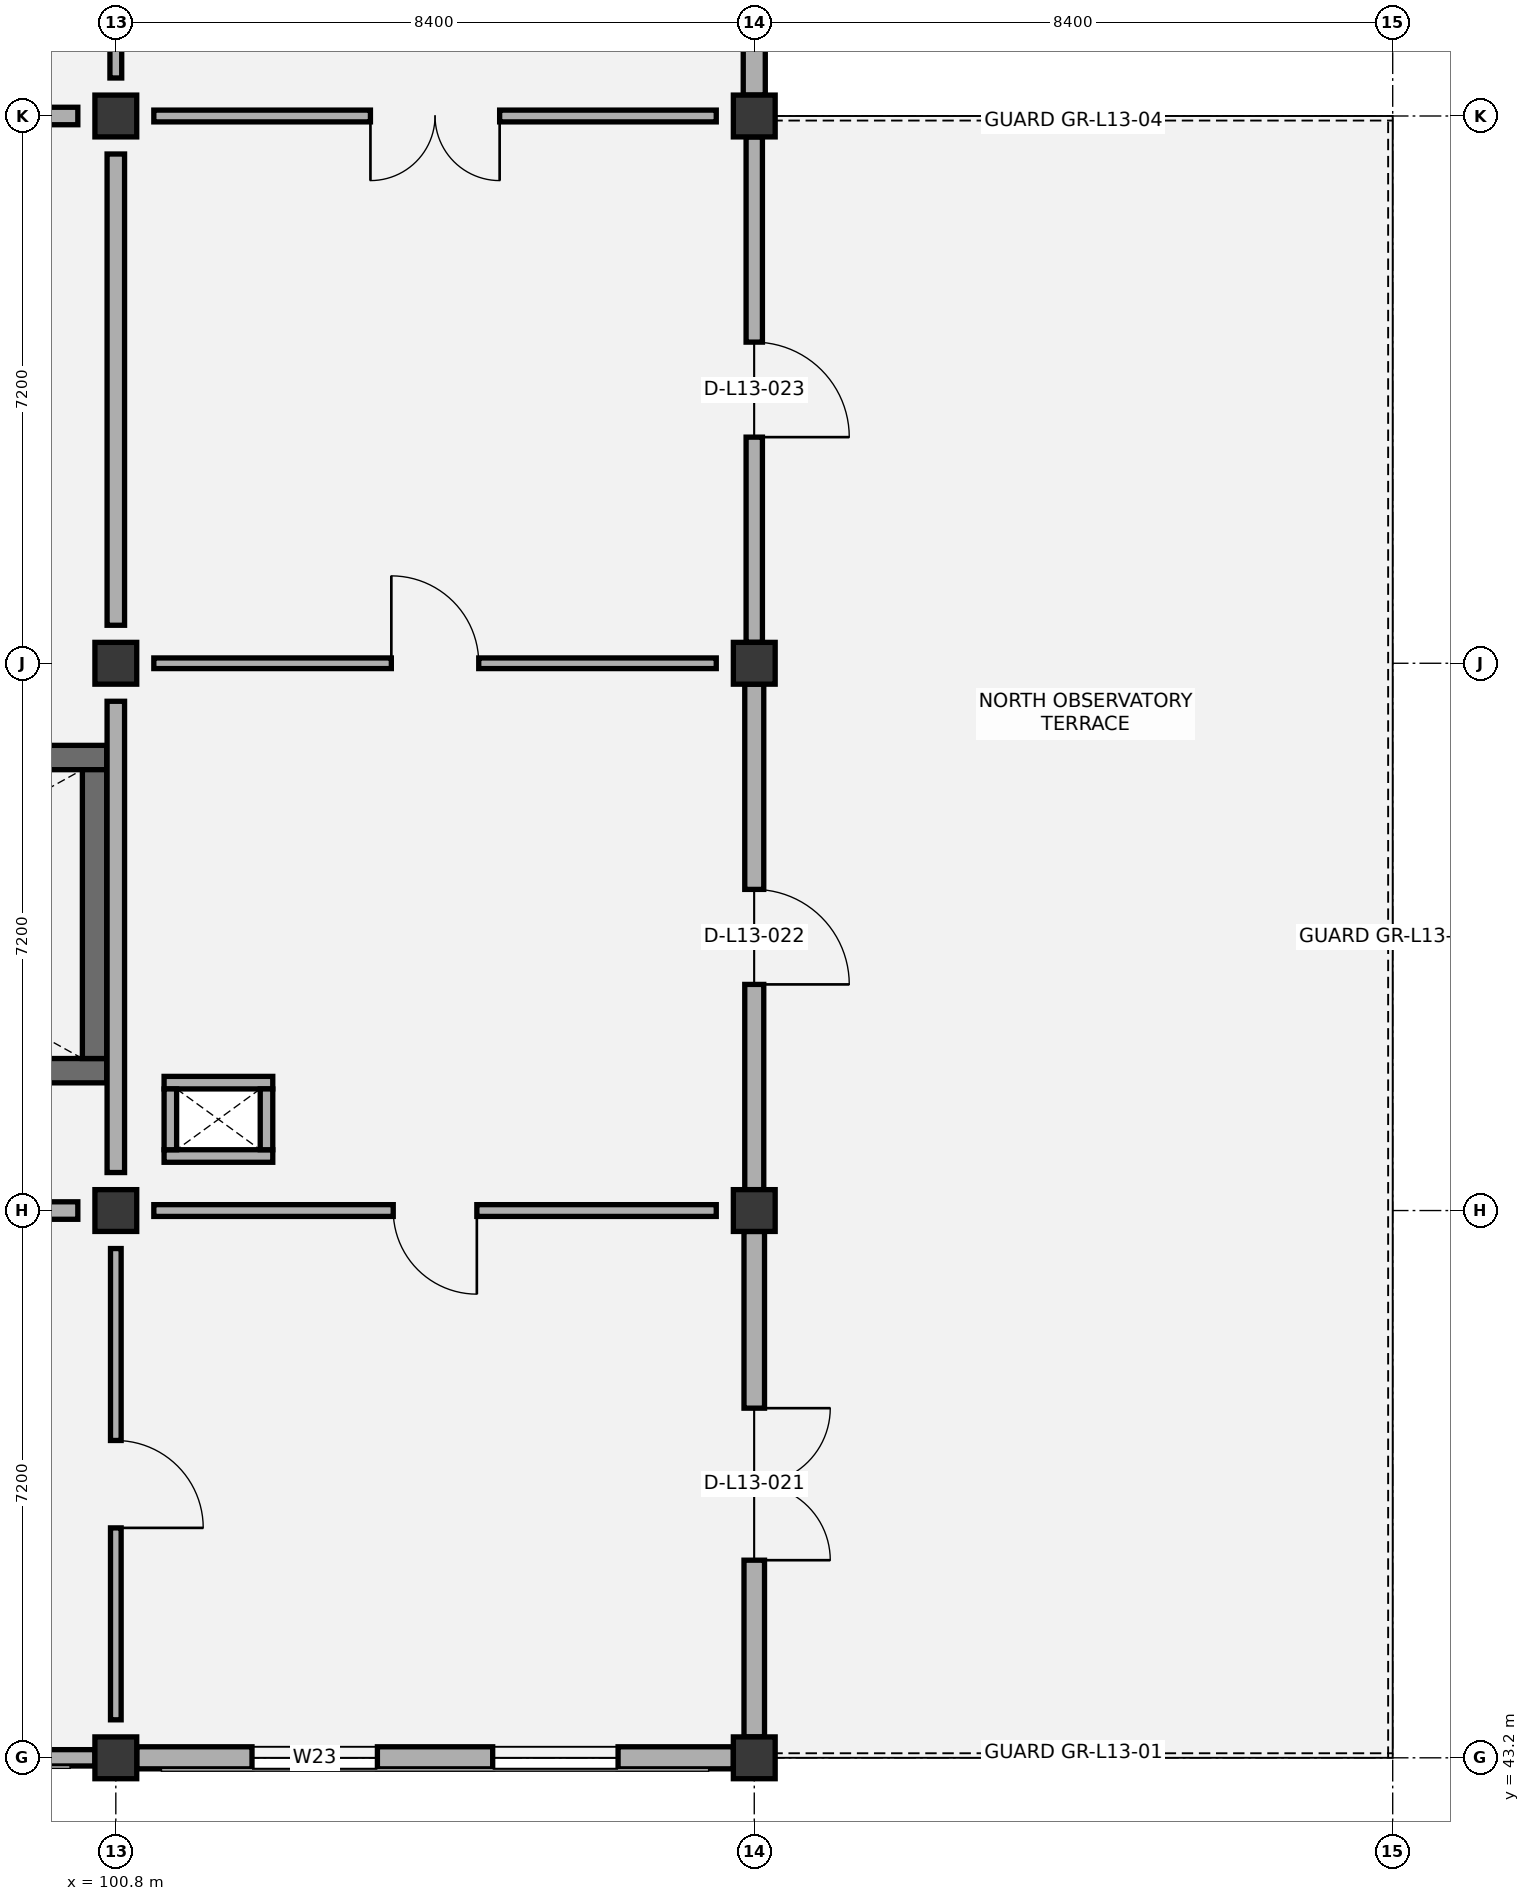
"""IFC4 building model, lengths in metres.
Left out: names, types, materials, properties, quantities, classifications, styles, units other than length and angle.
Written with IfcOpenShell. Run it as: python <this file> out.ifc"""

import sys

from ifc_helpers import new_model, si_unit, direction, frame, frame_2d, origin, origin_2d, place, context, subcontext, project, spatial, rectangle, extrude, element, fill, save


model = new_model("IFC4")
c1 = context("Model", 3, precision=1e-05, world=origin(), true_north=direction((0.0, 1.0)))
c2 = subcontext(c1, "Body", "Model", "MODEL_VIEW")
j1 = project(units=[si_unit("LENGTHUNIT", "METRE"), si_unit("PLANEANGLEUNIT", "RADIAN")], contexts=[c1])
p1 = place(None, origin())
s1 = spatial("IfcSite", under=j1, at=p1, CompositionType="ELEMENT")
p2 = place(p1, origin())
s2 = spatial("IfcBuilding", under=s1, at=p2, CompositionType="ELEMENT")
p3 = place(p2, frame((0.0, 0.0, 60.6)))
s3 = spatial("IfcBuildingStorey", under=s2, at=p3, CompositionType="ELEMENT", Elevation=60.6)
for number, where, z_axis, x_axis in (
    (1, (100.8, 43.2, 0.0), (0.0, 0.0, 1.0), (1.0, 0.0, 0.0)),
    (2, (100.8, 50.4, 0.0), (0.0, 0.0, 1.0), (1.0, 0.0, 0.0)),
    (3, (100.8, 57.6, 0.0), (0.0, 0.0, 1.0), (1.0, 0.0, 0.0)),
    (4, (100.8, 64.8, 0.0), (0.0, 0.0, 1.0), (1.0, 0.0, 0.0)),
    (5, (109.2, 43.2, 0.0), (0.0, 0.0, 1.0), (1.0, 0.0, 0.0)),
    (6, (109.2, 50.4, 0.0), (0.0, 0.0, 1.0), (1.0, 0.0, 0.0)),
    (7, (109.2, 57.6, 0.0), (0.0, 0.0, 1.0), (1.0, 0.0, 0.0)),
    (8, (109.2, 64.8, 0.0), (0.0, 0.0, 1.0), (1.0, 0.0, 0.0)),
):
    element("IfcColumn", number, at=place(p3, frame(where, z_axis=z_axis, x_axis=x_axis)), inside=s3, PredefinedType="COLUMN", context=c2, shape_type="SweptSolid", body=[
        extrude(rectangle(XDim=0.55, YDim=0.55, at=origin_2d()), origin(), (0.0, 0.0, 1.0), 4.2),
    ])
p4 = place(p3, frame((93.2, 52.24, 0.0), z_axis=(0.0, 0.0, 1.0), x_axis=(1.0, 0.0, 0.0)))
e9 = element("IfcWall", 9, at=p4, inside=s3, PredefinedType="SHEAR", context=c2, shape_type="SweptSolid", body=[
    extrude(rectangle(XDim=7.48, YDim=0.32, at=frame_2d((3.74, 0.0))), origin(), (0.0, 0.0, 1.0), 3.95),
])
p5 = place(p4, frame((0.45, 0.0, 0.0)))
e10 = element("IfcOpeningElement", 10, at=p5, cuts=e9, PredefinedType="OPENING", context=c2, shape_type="SweptSolid", body=[
    extrude(rectangle(XDim=1.05, YDim=2.15, at=frame_2d((0.525, 1.075))), frame((0.0, 0.17, 0.0), z_axis=(0.0, -1.0, 0.0), x_axis=(1.0, 0.0, 0.0)), (0.0, 0.0, 1.0), 0.34),
])
p6 = place(p3, frame((93.2, 56.36, 0.0), z_axis=(0.0, 0.0, 1.0), x_axis=(1.0, 0.0, 0.0)))
e11 = element("IfcWall", 11, at=p6, inside=s3, PredefinedType="SHEAR", context=c2, shape_type="SweptSolid", body=[
    extrude(rectangle(XDim=7.48, YDim=0.32, at=frame_2d((3.74, 0.0))), origin(), (0.0, 0.0, 1.0), 3.95),
])
p7 = place(p3, frame((100.52, 52.4, 0.0), z_axis=(0.0, 0.0, 1.0), x_axis=(0.0, 1.0, 0.0)))
e12 = element("IfcWall", 12, at=p7, inside=s3, PredefinedType="SHEAR", context=c2, shape_type="SweptSolid", body=[
    extrude(rectangle(XDim=3.8, YDim=0.32, at=frame_2d((1.9, 0.0))), origin(), (0.0, 0.0, 1.0), 3.95),
])
p8 = place(p3, frame((92.675, 43.2, 0.0), z_axis=(0.0, 0.0, 1.0), x_axis=(1.0, 0.0, 0.0)))
e13 = element("IfcWall", 13, at=p8, inside=s3, PredefinedType="SOLIDWALL", context=c2, shape_type="SweptSolid", body=[
    extrude(rectangle(XDim=7.85, YDim=0.215, at=frame_2d((3.925, 0.0))), origin(), (0.0, 0.0, 1.0), 3.395),
])
p9 = place(p8, frame((1.417, 0.0, 0.95)))
e14 = element("IfcOpeningElement", 14, at=p9, cuts=e13, PredefinedType="OPENING", context=c2, shape_type="SweptSolid", body=[
    extrude(rectangle(XDim=1.8, YDim=1.5, at=frame_2d((0.9, 0.75))), frame((0.0, 0.117, 0.0), z_axis=(0.0, -1.0, 0.0), x_axis=(1.0, 0.0, 0.0)), (0.0, 0.0, 1.0), 0.235),
])
p10 = place(p8, frame((4.633, 0.0, 0.95)))
e15 = element("IfcOpeningElement", 15, at=p10, cuts=e13, PredefinedType="OPENING", context=c2, shape_type="SweptSolid", body=[
    extrude(rectangle(XDim=1.8, YDim=1.5, at=frame_2d((0.9, 0.75))), frame((0.0, 0.117, 0.0), z_axis=(0.0, -1.0, 0.0), x_axis=(1.0, 0.0, 0.0)), (0.0, 0.0, 1.0), 0.235),
])
p11 = place(p3, frame((101.075, 43.2, 0.0), z_axis=(0.0, 0.0, 1.0), x_axis=(1.0, 0.0, 0.0)))
e16 = element("IfcWall", 16, at=p11, inside=s3, PredefinedType="SOLIDWALL", context=c2, shape_type="SweptSolid", body=[
    extrude(rectangle(XDim=7.85, YDim=0.29, at=frame_2d((3.925, 0.0))), origin(), (0.0, 0.0, 1.0), 3.395),
])
p12 = place(p11, frame((1.517, 0.0, 0.95)))
e17 = element("IfcOpeningElement", 17, at=p12, cuts=e16, PredefinedType="OPENING", context=c2, shape_type="SweptSolid", body=[
    extrude(rectangle(XDim=1.65, YDim=1.65, at=frame_2d((0.825, 0.825))), frame((0.0, 0.155, 0.0), z_axis=(0.0, -1.0, 0.0), x_axis=(1.0, 0.0, 0.0)), (0.0, 0.0, 1.0), 0.31),
])
p13 = place(p11, frame((4.683, 0.0, 0.95)))
e18 = element("IfcOpeningElement", 18, at=p13, cuts=e16, PredefinedType="OPENING", context=c2, shape_type="SweptSolid", body=[
    extrude(rectangle(XDim=1.65, YDim=1.65, at=frame_2d((0.825, 0.825))), frame((0.0, 0.155, 0.0), z_axis=(0.0, -1.0, 0.0), x_axis=(1.0, 0.0, 0.0)), (0.0, 0.0, 1.0), 0.31),
])
p14 = place(p3, frame((109.2, 43.475, 0.0), z_axis=(0.0, 0.0, 1.0), x_axis=(0.0, 1.0, 0.0)))
e19 = element("IfcWall", 19, at=p14, inside=s3, PredefinedType="SOLIDWALL", context=c2, shape_type="SweptSolid", body=[
    extrude(rectangle(XDim=6.65, YDim=0.27, at=frame_2d((3.325, 0.0))), origin(), (0.0, 0.0, 1.0), 3.395),
])
p15 = place(p14, frame((2.325, 0.0, 0.0)))
e20 = element("IfcOpeningElement", 20, at=p15, cuts=e19, PredefinedType="OPENING", context=c2, shape_type="SweptSolid", body=[
    extrude(rectangle(XDim=2.0, YDim=2.4, at=frame_2d((1.0, 1.2))), frame((0.0, 0.145, 0.0), z_axis=(0.0, -1.0, 0.0), x_axis=(1.0, 0.0, 0.0)), (0.0, 0.0, 1.0), 0.29),
])
p16 = place(p3, frame((109.2, 50.675, 0.0), z_axis=(0.0, 0.0, 1.0), x_axis=(0.0, 1.0, 0.0)))
e21 = element("IfcWall", 21, at=p16, inside=s3, PredefinedType="SOLIDWALL", context=c2, shape_type="SweptSolid", body=[
    extrude(rectangle(XDim=6.65, YDim=0.25, at=frame_2d((3.325, 0.0))), origin(), (0.0, 0.0, 1.0), 3.395),
])
p17 = place(p16, frame((2.7, 0.0, 0.0)))
e22 = element("IfcOpeningElement", 22, at=p17, cuts=e21, PredefinedType="OPENING", context=c2, shape_type="SweptSolid", body=[
    extrude(rectangle(XDim=1.25, YDim=2.15, at=frame_2d((0.625, 1.075))), frame((0.0, 0.135, 0.0), z_axis=(0.0, -1.0, 0.0), x_axis=(1.0, 0.0, 0.0)), (0.0, 0.0, 1.0), 0.27),
])
p18 = place(p3, frame((109.2, 57.875, 0.0), z_axis=(0.0, 0.0, 1.0), x_axis=(0.0, 1.0, 0.0)))
e23 = element("IfcWall", 23, at=p18, inside=s3, PredefinedType="SOLIDWALL", context=c2, shape_type="SweptSolid", body=[
    extrude(rectangle(XDim=6.65, YDim=0.215, at=frame_2d((3.325, 0.0))), origin(), (0.0, 0.0, 1.0), 3.395),
])
p19 = place(p18, frame((2.7, 0.0, 0.0)))
e24 = element("IfcOpeningElement", 24, at=p19, cuts=e23, PredefinedType="OPENING", context=c2, shape_type="SweptSolid", body=[
    extrude(rectangle(XDim=1.25, YDim=2.15, at=frame_2d((0.625, 1.075))), frame((0.0, 0.117, 0.0), z_axis=(0.0, -1.0, 0.0), x_axis=(1.0, 0.0, 0.0)), (0.0, 0.0, 1.0), 0.235),
])
p20 = place(p3, frame((109.2, 65.075, 0.0), z_axis=(0.0, 0.0, 1.0), x_axis=(0.0, 1.0, 0.0)))
e25 = element("IfcWall", 25, at=p20, inside=s3, PredefinedType="SOLIDWALL", context=c2, shape_type="SweptSolid", body=[
    extrude(rectangle(XDim=6.65, YDim=0.29, at=frame_2d((3.325, 0.0))), origin(), (0.0, 0.0, 1.0), 3.445),
])
p21 = place(p20, frame((1.317, 0.0, 0.95)))
e26 = element("IfcOpeningElement", 26, at=p21, cuts=e25, PredefinedType="OPENING", context=c2, shape_type="SweptSolid", body=[
    extrude(rectangle(XDim=1.35, YDim=1.65, at=frame_2d((0.675, 0.825))), frame((0.0, 0.155, 0.0), z_axis=(0.0, -1.0, 0.0), x_axis=(1.0, 0.0, 0.0)), (0.0, 0.0, 1.0), 0.31),
])
p22 = place(p20, frame((3.983, 0.0, 0.95)))
e27 = element("IfcOpeningElement", 27, at=p22, cuts=e25, PredefinedType="OPENING", context=c2, shape_type="SweptSolid", body=[
    extrude(rectangle(XDim=1.35, YDim=1.65, at=frame_2d((0.675, 0.825))), frame((0.0, 0.155, 0.0), z_axis=(0.0, -1.0, 0.0), x_axis=(1.0, 0.0, 0.0)), (0.0, 0.0, 1.0), 0.31),
])
for number, where, z_axis, x_axis in (
    (28, (101.435, 51.117, 0.0), (0.0, 0.0, 1.0), (1.0, 0.0, 0.0)),
    (29, (101.435, 52.083, 0.0), (0.0, 0.0, 1.0), (1.0, 0.0, 0.0)),
):
    element("IfcWall", number, at=place(p3, frame(where, z_axis=z_axis, x_axis=x_axis)), inside=s3, PredefinedType="PARTITIONING", context=c2, shape_type="SweptSolid", body=[
        extrude(rectangle(XDim=1.43, YDim=0.165, at=frame_2d((0.715, 0.0))), origin(), (0.0, 0.0, 1.0), 3.95),
    ])
for number, where, z_axis, x_axis in (
    (30, (101.518, 51.2, 0.0), (0.0, 0.0, 1.0), (0.0, 1.0, 0.0)),
    (31, (102.782, 51.2, 0.0), (0.0, 0.0, 1.0), (0.0, 1.0, 0.0)),
):
    element("IfcWall", number, at=place(p3, frame(where, z_axis=z_axis, x_axis=x_axis)), inside=s3, PredefinedType="PARTITIONING", context=c2, shape_type="SweptSolid", body=[
        extrude(rectangle(XDim=0.8, YDim=0.165, at=frame_2d((0.4, 0.0))), origin(), (0.0, 0.0, 1.0), 3.95),
    ])
p23 = place(p3, frame((100.8, 43.7, 0.0), z_axis=(0.0, 0.0, 1.0), x_axis=(0.0, 1.0, 0.0)))
e32 = element("IfcWall", 32, at=p23, inside=s3, PredefinedType="PARTITIONING", context=c2, shape_type="SweptSolid", body=[
    extrude(rectangle(XDim=6.2, YDim=0.14, at=frame_2d((3.1, 0.0))), origin(), (0.0, 0.0, 1.0), 3.445),
])
p24 = place(p23, frame((2.525, 0.0, 0.0)))
e33 = element("IfcOpeningElement", 33, at=p24, cuts=e32, PredefinedType="OPENING", context=c2, shape_type="SweptSolid", body=[
    extrude(rectangle(XDim=1.15, YDim=2.1, at=frame_2d((0.575, 1.05))), frame((0.0, 0.08, 0.0), z_axis=(0.0, -1.0, 0.0), x_axis=(1.0, 0.0, 0.0)), (0.0, 0.0, 1.0), 0.16),
])
p25 = place(p3, frame((92.9, 50.4, 0.0), z_axis=(0.0, 0.0, 1.0), x_axis=(1.0, 0.0, 0.0)))
e34 = element("IfcWall", 34, at=p25, inside=s3, PredefinedType="PARTITIONING", context=c2, shape_type="SweptSolid", body=[
    extrude(rectangle(XDim=7.4, YDim=0.23, at=frame_2d((3.7, 0.0))), origin(), (0.0, 0.0, 1.0), 3.655),
])
p26 = place(p25, frame((2.95, 0.0, 0.0)))
e35 = element("IfcOpeningElement", 35, at=p26, cuts=e34, PredefinedType="OPENING", context=c2, shape_type="SweptSolid", body=[
    extrude(rectangle(XDim=1.5, YDim=2.15, at=frame_2d((0.75, 1.075))), frame((0.0, 0.125, 0.0), z_axis=(0.0, -1.0, 0.0), x_axis=(1.0, 0.0, 0.0)), (0.0, 0.0, 1.0), 0.25),
])
p27 = place(p3, frame((100.8, 50.9, 0.0), z_axis=(0.0, 0.0, 1.0), x_axis=(0.0, 1.0, 0.0)))
e36 = element("IfcWall", 36, at=p27, inside=s3, PredefinedType="PARTITIONING", context=c2, shape_type="SweptSolid", body=[
    extrude(rectangle(XDim=6.2, YDim=0.23, at=frame_2d((3.1, 0.0))), origin(), (0.0, 0.0, 1.0), 3.655),
])
p28 = place(p3, frame((100.8, 58.1, 0.0), z_axis=(0.0, 0.0, 1.0), x_axis=(0.0, 1.0, 0.0)))
e37 = element("IfcWall", 37, at=p28, inside=s3, PredefinedType="PARTITIONING", context=c2, shape_type="SweptSolid", body=[
    extrude(rectangle(XDim=6.2, YDim=0.23, at=frame_2d((3.1, 0.0))), origin(), (0.0, 0.0, 1.0), 3.445),
])
p29 = place(p3, frame((92.9, 64.8, 0.0), z_axis=(0.0, 0.0, 1.0), x_axis=(1.0, 0.0, 0.0)))
e38 = element("IfcWall", 38, at=p29, inside=s3, PredefinedType="PARTITIONING", context=c2, shape_type="SweptSolid", body=[
    extrude(rectangle(XDim=7.4, YDim=0.23, at=frame_2d((3.7, 0.0))), origin(), (0.0, 0.0, 1.0), 3.655),
])
p30 = place(p3, frame((100.8, 65.3, 0.0), z_axis=(0.0, 0.0, 1.0), x_axis=(0.0, 1.0, 0.0)))
e39 = element("IfcWall", 39, at=p30, inside=s3, PredefinedType="PARTITIONING", context=c2, shape_type="SweptSolid", body=[
    extrude(rectangle(XDim=6.2, YDim=0.155, at=frame_2d((3.1, 0.0))), origin(), (0.0, 0.0, 1.0), 3.495),
])
p31 = place(p30, frame((2.4, 0.0, 0.0)))
e40 = element("IfcOpeningElement", 40, at=p31, cuts=e39, PredefinedType="OPENING", context=c2, shape_type="SweptSolid", body=[
    extrude(rectangle(XDim=1.4, YDim=2.15, at=frame_2d((0.7, 1.075))), frame((0.0, 0.087, 0.0), z_axis=(0.0, -1.0, 0.0), x_axis=(1.0, 0.0, 0.0)), (0.0, 0.0, 1.0), 0.175),
])
p32 = place(p3, frame((101.3, 50.4, 0.0), z_axis=(0.0, 0.0, 1.0), x_axis=(1.0, 0.0, 0.0)))
e41 = element("IfcWall", 41, at=p32, inside=s3, PredefinedType="PARTITIONING", context=c2, shape_type="SweptSolid", body=[
    extrude(rectangle(XDim=7.4, YDim=0.155, at=frame_2d((3.7, 0.0))), origin(), (0.0, 0.0, 1.0), 3.675),
])
p33 = place(p32, frame((3.15, 0.0, 0.0)))
e42 = element("IfcOpeningElement", 42, at=p33, cuts=e41, PredefinedType="OPENING", context=c2, shape_type="SweptSolid", body=[
    extrude(rectangle(XDim=1.1, YDim=2.1, at=frame_2d((0.55, 1.05))), frame((0.0, 0.087, 0.0), z_axis=(0.0, -1.0, 0.0), x_axis=(1.0, 0.0, 0.0)), (0.0, 0.0, 1.0), 0.175),
])
p34 = place(p3, frame((101.3, 57.6, 0.0), z_axis=(0.0, 0.0, 1.0), x_axis=(1.0, 0.0, 0.0)))
e43 = element("IfcWall", 43, at=p34, inside=s3, PredefinedType="PARTITIONING", context=c2, shape_type="SweptSolid", body=[
    extrude(rectangle(XDim=7.4, YDim=0.14, at=frame_2d((3.7, 0.0))), origin(), (0.0, 0.0, 1.0), 3.675),
])
p35 = place(p34, frame((3.125, 0.0, 0.0)))
e44 = element("IfcOpeningElement", 44, at=p35, cuts=e43, PredefinedType="OPENING", context=c2, shape_type="SweptSolid", body=[
    extrude(rectangle(XDim=1.15, YDim=2.1, at=frame_2d((0.575, 1.05))), frame((0.0, 0.08, 0.0), z_axis=(0.0, -1.0, 0.0), x_axis=(1.0, 0.0, 0.0)), (0.0, 0.0, 1.0), 0.16),
])
p36 = place(p3, frame((101.3, 64.8, 0.0), z_axis=(0.0, 0.0, 1.0), x_axis=(1.0, 0.0, 0.0)))
e45 = element("IfcWall", 45, at=p36, inside=s3, PredefinedType="PARTITIONING", context=c2, shape_type="SweptSolid", body=[
    extrude(rectangle(XDim=7.4, YDim=0.155, at=frame_2d((3.7, 0.0))), origin(), (0.0, 0.0, 1.0), 3.675),
])
p37 = place(p36, frame((2.85, 0.0, 0.0)))
e46 = element("IfcOpeningElement", 46, at=p37, cuts=e45, PredefinedType="OPENING", context=c2, shape_type="SweptSolid", body=[
    extrude(rectangle(XDim=1.7, YDim=2.25, at=frame_2d((0.85, 1.125))), frame((0.0, 0.087, 0.0), z_axis=(0.0, -1.0, 0.0), x_axis=(1.0, 0.0, 0.0)), (0.0, 0.0, 1.0), 0.175),
])
p38 = place(p12, origin())
e47 = element("IfcWindow", 47, at=p38, inside=s3, PartitioningType="SINGLE_PANEL", PredefinedType="WINDOW", context=c2, shape_type="SweptSolid", body=[
    extrude(rectangle(XDim=1.65, YDim=1.65, at=frame_2d((0.825, 0.825))), frame((0.0, 0.03, 0.0), z_axis=(0.0, -1.0, 0.0), x_axis=(1.0, 0.0, 0.0)), (0.0, 0.0, 1.0), 0.06),
])
fill(e17, e47)
p39 = place(p13, origin())
e48 = element("IfcWindow", 48, at=p39, inside=s3, PartitioningType="SINGLE_PANEL", PredefinedType="WINDOW", context=c2, shape_type="SweptSolid", body=[
    extrude(rectangle(XDim=1.65, YDim=1.65, at=frame_2d((0.825, 0.825))), frame((0.0, 0.03, 0.0), z_axis=(0.0, -1.0, 0.0), x_axis=(1.0, 0.0, 0.0)), (0.0, 0.0, 1.0), 0.06),
])
fill(e18, e48)
p40 = place(p15, frame((2.0, 0.0, 0.0), z_axis=(0.0, 0.0, 1.0), x_axis=(-1.0, 0.0, 0.0)))
e49 = element("IfcDoor", 49, at=p40, inside=s3, OperationType="DOUBLE_DOOR_SINGLE_SWING", PredefinedType="DOOR", context=c2, shape_type="SweptSolid", body=[
    extrude(rectangle(XDim=2.0, YDim=2.4, at=frame_2d((1.0, 1.2))), frame((0.0, 0.025, 0.0), z_axis=(0.0, -1.0, 0.0), x_axis=(1.0, 0.0, 0.0)), (0.0, 0.0, 1.0), 0.05),
])
fill(e20, e49)
p41 = place(p17, frame((1.25, 0.0, 0.0), z_axis=(0.0, 0.0, 1.0), x_axis=(-1.0, 0.0, 0.0)))
e50 = element("IfcDoor", 50, at=p41, inside=s3, OperationType="SINGLE_SWING_RIGHT", PredefinedType="DOOR", context=c2, shape_type="SweptSolid", body=[
    extrude(rectangle(XDim=1.25, YDim=2.15, at=frame_2d((0.625, 1.075))), frame((0.0, 0.025, 0.0), z_axis=(0.0, -1.0, 0.0), x_axis=(1.0, 0.0, 0.0)), (0.0, 0.0, 1.0), 0.05),
])
fill(e22, e50)
p42 = place(p19, frame((1.25, 0.0, 0.0), z_axis=(0.0, 0.0, 1.0), x_axis=(-1.0, 0.0, 0.0)))
e51 = element("IfcDoor", 51, at=p42, inside=s3, OperationType="SINGLE_SWING_RIGHT", PredefinedType="DOOR", context=c2, shape_type="SweptSolid", body=[
    extrude(rectangle(XDim=1.25, YDim=2.15, at=frame_2d((0.625, 1.075))), frame((0.0, 0.025, 0.0), z_axis=(0.0, -1.0, 0.0), x_axis=(1.0, 0.0, 0.0)), (0.0, 0.0, 1.0), 0.05),
])
fill(e24, e51)
p43 = place(p24, frame((1.15, 0.0, 0.0), z_axis=(0.0, 0.0, 1.0), x_axis=(-1.0, 0.0, 0.0)))
e52 = element("IfcDoor", 52, at=p43, inside=s3, OperationType="SINGLE_SWING_RIGHT", PredefinedType="DOOR", context=c2, shape_type="SweptSolid", body=[
    extrude(rectangle(XDim=1.15, YDim=2.1, at=frame_2d((0.575, 1.05))), frame((0.0, 0.025, 0.0), z_axis=(0.0, -1.0, 0.0), x_axis=(1.0, 0.0, 0.0)), (0.0, 0.0, 1.0), 0.05),
])
fill(e33, e52)
p44 = place(p33, frame((1.1, 0.0, 0.0), z_axis=(0.0, 0.0, 1.0), x_axis=(-1.0, 0.0, 0.0)))
e53 = element("IfcDoor", 53, at=p44, inside=s3, OperationType="SINGLE_SWING_LEFT", PredefinedType="DOOR", context=c2, shape_type="SweptSolid", body=[
    extrude(rectangle(XDim=1.1, YDim=2.1, at=frame_2d((0.55, 1.05))), frame((0.0, 0.025, 0.0), z_axis=(0.0, -1.0, 0.0), x_axis=(1.0, 0.0, 0.0)), (0.0, 0.0, 1.0), 0.05),
])
fill(e42, e53)
p45 = place(p35, origin())
e54 = element("IfcDoor", 54, at=p45, inside=s3, OperationType="SINGLE_SWING_LEFT", PredefinedType="DOOR", context=c2, shape_type="SweptSolid", body=[
    extrude(rectangle(XDim=1.15, YDim=2.1, at=frame_2d((0.575, 1.05))), frame((0.0, 0.025, 0.0), z_axis=(0.0, -1.0, 0.0), x_axis=(1.0, 0.0, 0.0)), (0.0, 0.0, 1.0), 0.05),
])
fill(e44, e54)
p46 = place(p37, frame((1.7, 0.0, 0.0), z_axis=(0.0, 0.0, 1.0), x_axis=(-1.0, 0.0, 0.0)))
e55 = element("IfcDoor", 55, at=p46, inside=s3, OperationType="DOUBLE_DOOR_SINGLE_SWING", PredefinedType="DOOR", context=c2, shape_type="SweptSolid", body=[
    extrude(rectangle(XDim=1.7, YDim=2.25, at=frame_2d((0.85, 1.125))), frame((0.0, 0.025, 0.0), z_axis=(0.0, -1.0, 0.0), x_axis=(1.0, 0.0, 0.0)), (0.0, 0.0, 1.0), 0.05),
])
fill(e46, e55)
save(model, sys.argv[1])
